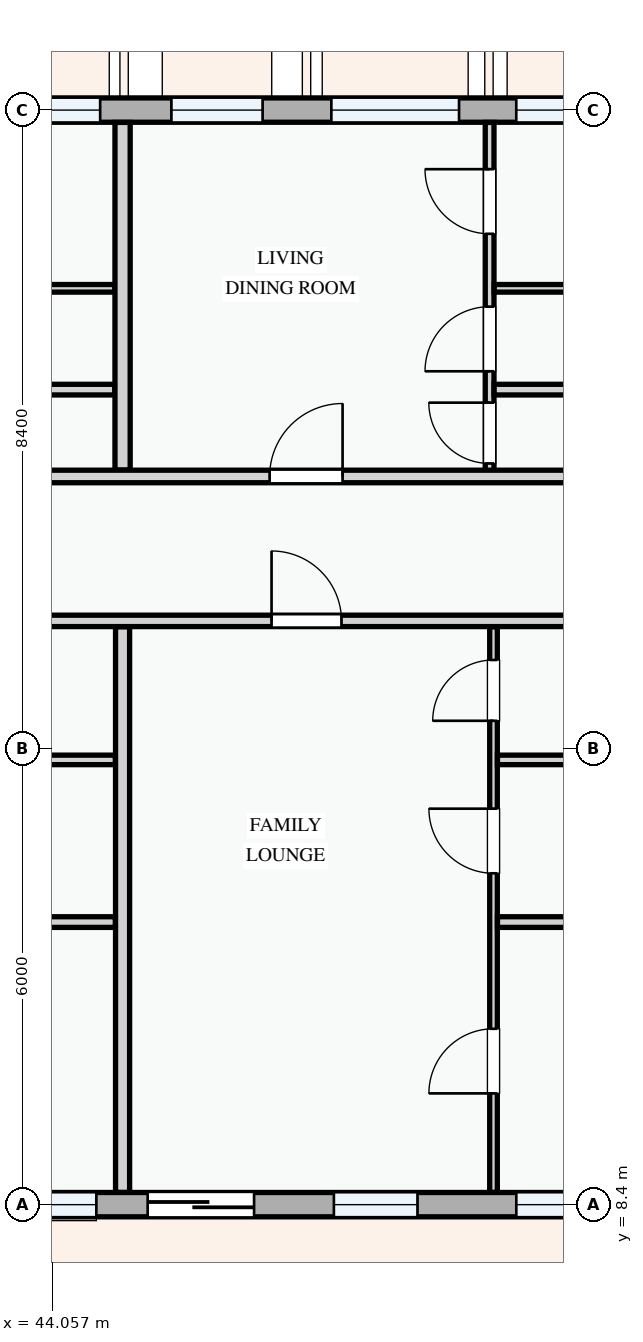
"""IFC4 building model, lengths in metres.
Left out: names, types, materials, properties, quantities, classifications, styles, units other than length and angle.
Written with IfcOpenShell. Run it as: python <this file> out.ifc"""

import sys

from ifc_helpers import new_model, si_unit, direction, frame, frame_2d, origin, place, context, subcontext, project, spatial, rectangle, extrude, element, fill, save


model = new_model("IFC4")
c1 = context("Model", 3, precision=1e-05, world=origin(), true_north=direction((0.0, 1.0)))
c2 = subcontext(c1, "Body", "Model", "MODEL_VIEW")
j1 = project(units=[si_unit("LENGTHUNIT", "METRE"), si_unit("PLANEANGLEUNIT", "RADIAN")], contexts=[c1])
p1 = place(None, origin())
s1 = spatial("IfcSite", under=j1, at=p1, CompositionType="ELEMENT")
p2 = place(p1, origin())
s2 = spatial("IfcBuilding", under=s1, at=p2, CompositionType="ELEMENT")
p3 = place(p2, frame((0.0, 0.0, 14.7)))
s3 = spatial("IfcBuildingStorey", under=s2, at=p3, CompositionType="ELEMENT", Elevation=14.7)
p4 = place(p3, frame((43.2, 8.4, 0.0), z_axis=(0.0, 0.0, 1.0), x_axis=(1.0, 0.0, 0.0)))
e1 = element("IfcWall", 1, at=p4, inside=s3, PredefinedType="STANDARD", context=c2, shape_type="SweptSolid", body=[
    extrude(rectangle(XDim=8.4, YDim=0.32, at=frame_2d((4.2, 0.0))), origin(), (0.0, 0.0, 1.0), 2.375),
])
p5 = place(p4, frame((2.11, 0.0, 0.0)))
e2 = element("IfcOpeningElement", 2, at=p5, cuts=e1, PredefinedType="OPENING", context=c2, shape_type="SweptSolid", body=[
    extrude(rectangle(XDim=1.4, YDim=2.2, at=frame_2d((0.7, 1.1))), frame((0.0, 0.17, 0.0), z_axis=(0.0, -1.0, 0.0), x_axis=(1.0, 0.0, 0.0)), (0.0, 0.0, 1.0), 0.34),
])
p6 = place(p4, frame((0.535, 0.0, 0.78)))
e3 = element("IfcOpeningElement", 3, at=p6, cuts=e1, PredefinedType="OPENING", context=c2, shape_type="SweptSolid", body=[
    extrude(rectangle(XDim=0.9, YDim=1.2, at=frame_2d((0.45, 0.6))), frame((0.0, 0.17, 0.0), z_axis=(0.0, -1.0, 0.0), x_axis=(1.0, 0.0, 0.0)), (0.0, 0.0, 1.0), 0.34),
])
p7 = place(p4, frame((4.56, 0.0, 0.78)))
e4 = element("IfcOpeningElement", 4, at=p7, cuts=e1, PredefinedType="OPENING", context=c2, shape_type="SweptSolid", body=[
    extrude(rectangle(XDim=1.1, YDim=1.3, at=frame_2d((0.55, 0.65))), frame((0.0, 0.17, 0.0), z_axis=(0.0, -1.0, 0.0), x_axis=(1.0, 0.0, 0.0)), (0.0, 0.0, 1.0), 0.34),
])
p8 = place(p4, frame((6.96, 0.0, 0.78)))
e5 = element("IfcOpeningElement", 5, at=p8, cuts=e1, PredefinedType="OPENING", context=c2, shape_type="SweptSolid", body=[
    extrude(rectangle(XDim=0.95, YDim=1.15, at=frame_2d((0.475, 0.575))), frame((0.0, 0.17, 0.0), z_axis=(0.0, -1.0, 0.0), x_axis=(1.0, 0.0, 0.0)), (0.0, 0.0, 1.0), 0.34),
])
p9 = place(p3, frame((51.6, 22.8, 0.0), z_axis=(0.0, 0.0, 1.0), x_axis=(-1.0, 0.0, 0.0)))
e6 = element("IfcWall", 6, at=p9, inside=s3, PredefinedType="STANDARD", context=c2, shape_type="SweptSolid", body=[
    extrude(rectangle(XDim=8.4, YDim=0.32, at=frame_2d((4.2, 0.0))), origin(), (0.0, 0.0, 1.0), 2.375),
])
p10 = place(p9, frame((0.541, 0.0, 0.78)))
e7 = element("IfcOpeningElement", 7, at=p10, cuts=e6, PredefinedType="OPENING", context=c2, shape_type="SweptSolid", body=[
    extrude(rectangle(XDim=0.9, YDim=1.2, at=frame_2d((0.45, 0.6))), frame((0.0, 0.17, 0.0), z_axis=(0.0, -1.0, 0.0), x_axis=(1.0, 0.0, 0.0)), (0.0, 0.0, 1.0), 0.34),
])
p11 = place(p9, frame((2.193, 0.0, 0.78)))
e8 = element("IfcOpeningElement", 8, at=p11, cuts=e6, PredefinedType="OPENING", context=c2, shape_type="SweptSolid", body=[
    extrude(rectangle(XDim=1.68, YDim=1.46, at=frame_2d((0.84, 0.73))), frame((0.0, 0.17, 0.0), z_axis=(0.0, -1.0, 0.0), x_axis=(1.0, 0.0, 0.0)), (0.0, 0.0, 1.0), 0.34),
])
p12 = place(p9, frame((4.778, 0.0, 0.78)))
e9 = element("IfcOpeningElement", 9, at=p12, cuts=e6, PredefinedType="OPENING", context=c2, shape_type="SweptSolid", body=[
    extrude(rectangle(XDim=1.2, YDim=1.35, at=frame_2d((0.6, 0.675))), frame((0.0, 0.17, 0.0), z_axis=(0.0, -1.0, 0.0), x_axis=(1.0, 0.0, 0.0)), (0.0, 0.0, 1.0), 0.34),
])
p13 = place(p9, frame((6.915, 0.0, 0.78)))
e10 = element("IfcOpeningElement", 10, at=p13, cuts=e6, PredefinedType="OPENING", context=c2, shape_type="SweptSolid", body=[
    extrude(rectangle(XDim=1.0, YDim=1.25, at=frame_2d((0.5, 0.625))), frame((0.0, 0.17, 0.0), z_axis=(0.0, -1.0, 0.0), x_axis=(1.0, 0.0, 0.0)), (0.0, 0.0, 1.0), 0.34),
])
p14 = place(p3, frame((39.102, 12.118, 0.0), z_axis=(0.0, 0.0, 1.0), x_axis=(1.0, 0.0, 0.0)))
e11 = element("IfcWall", 11, at=p14, inside=s3, PredefinedType="PARTITIONING", context=c2, shape_type="SweptSolid", body=[
    extrude(rectangle(XDim=5.783, YDim=0.14, at=frame_2d((2.892, 0.0))), origin(), (0.0, 0.0, 1.0), 3.0),
])
p15 = place(p3, frame((39.102, 14.251, 0.0), z_axis=(0.0, 0.0, 1.0), x_axis=(1.0, 0.0, 0.0)))
e12 = element("IfcWall", 12, at=p15, inside=s3, PredefinedType="PARTITIONING", context=c2, shape_type="SweptSolid", body=[
    extrude(rectangle(XDim=5.783, YDim=0.125, at=frame_2d((2.892, 0.0))), origin(), (0.0, 0.0, 1.0), 2.375),
])
p16 = place(p3, frame((39.072, 20.455, 0.0), z_axis=(0.0, 0.0, 1.0), x_axis=(1.0, 0.0, 0.0)))
e13 = element("IfcWall", 13, at=p16, inside=s3, PredefinedType="PARTITIONING", context=c2, shape_type="SweptSolid", body=[
    extrude(rectangle(XDim=5.806, YDim=0.1, at=frame_2d((2.903, 0.0))), origin(), (0.0, 0.0, 1.0), 3.0),
])
p17 = place(p3, frame((39.072, 19.122, 0.0), z_axis=(0.0, 0.0, 1.0), x_axis=(1.0, 0.0, 0.0)))
e14 = element("IfcWall", 14, at=p17, inside=s3, PredefinedType="PARTITIONING", context=c2, shape_type="SweptSolid", body=[
    extrude(rectangle(XDim=5.806, YDim=0.14, at=frame_2d((2.903, 0.0))), origin(), (0.0, 0.0, 1.0), 3.0),
])
p18 = place(p3, frame((49.86, 8.562, 0.0), z_axis=(0.0, 0.0, 1.0), x_axis=(0.0, 1.0, 0.0)))
e15 = element("IfcWall", 15, at=p18, inside=s3, PredefinedType="PARTITIONING", context=c2, shape_type="SweptSolid", body=[
    extrude(rectangle(XDim=7.441, YDim=0.1, at=frame_2d((3.72, 0.0))), origin(), (0.0, 0.0, 1.0), 3.0),
])
p19 = place(p18, frame((1.302, 0.0, 0.0)))
e16 = element("IfcOpeningElement", 16, at=p19, cuts=e15, PredefinedType="OPENING", context=c2, shape_type="SweptSolid", body=[
    extrude(rectangle(XDim=0.85, YDim=2.1, at=frame_2d((0.425, 1.05))), frame((0.0, 0.06, 0.0), z_axis=(0.0, -1.0, 0.0), x_axis=(1.0, 0.0, 0.0)), (0.0, 0.0, 1.0), 0.12),
])
p20 = place(p18, frame((4.198, 0.0, 0.0)))
e17 = element("IfcOpeningElement", 17, at=p20, cuts=e15, PredefinedType="OPENING", context=c2, shape_type="SweptSolid", body=[
    extrude(rectangle(XDim=0.85, YDim=2.1, at=frame_2d((0.425, 1.05))), frame((0.0, 0.06, 0.0), z_axis=(0.0, -1.0, 0.0), x_axis=(1.0, 0.0, 0.0)), (0.0, 0.0, 1.0), 0.12),
])
p21 = place(p18, frame((6.204, 0.0, 0.0)))
e18 = element("IfcOpeningElement", 18, at=p21, cuts=e15, PredefinedType="OPENING", context=c2, shape_type="SweptSolid", body=[
    extrude(rectangle(XDim=0.8, YDim=2.1, at=frame_2d((0.4, 1.05))), frame((0.0, 0.06, 0.0), z_axis=(0.0, -1.0, 0.0), x_axis=(1.0, 0.0, 0.0)), (0.0, 0.0, 1.0), 0.12),
])
p22 = place(p3, frame((49.912, 12.118, 0.0), z_axis=(0.0, 0.0, 1.0), x_axis=(1.0, 0.0, 0.0)))
e19 = element("IfcWall", 19, at=p22, inside=s3, PredefinedType="PARTITIONING", context=c2, shape_type="SweptSolid", body=[
    extrude(rectangle(XDim=7.526, YDim=0.14, at=frame_2d((3.763, 0.0))), origin(), (0.0, 0.0, 1.0), 3.0),
])
p23 = place(p3, frame((49.912, 14.251, 0.0), z_axis=(0.0, 0.0, 1.0), x_axis=(1.0, 0.0, 0.0)))
e20 = element("IfcWall", 20, at=p23, inside=s3, PredefinedType="PARTITIONING", context=c2, shape_type="SweptSolid", body=[
    extrude(rectangle(XDim=7.526, YDim=0.125, at=frame_2d((3.763, 0.0))), origin(), (0.0, 0.0, 1.0), 2.375),
])
p24 = place(p3, frame((49.809, 17.98, 0.0), z_axis=(0.0, 0.0, 1.0), x_axis=(0.0, 1.0, 0.0)))
e21 = element("IfcWall", 21, at=p24, inside=s3, PredefinedType="PARTITIONING", context=c2, shape_type="SweptSolid", body=[
    extrude(rectangle(XDim=4.658, YDim=0.115, at=frame_2d((2.329, 0.0))), origin(), (0.0, 0.0, 1.0), 3.0),
])
p25 = place(p24, frame((0.171, 0.0, 0.0)))
e22 = element("IfcOpeningElement", 22, at=p25, cuts=e21, PredefinedType="OPENING", context=c2, shape_type="SweptSolid", body=[
    extrude(rectangle(XDim=0.8, YDim=2.1, at=frame_2d((0.4, 1.05))), frame((0.0, 0.067, 0.0), z_axis=(0.0, -1.0, 0.0), x_axis=(1.0, 0.0, 0.0)), (0.0, 0.0, 1.0), 0.135),
])
p26 = place(p24, frame((1.384, 0.0, 0.0)))
e23 = element("IfcOpeningElement", 23, at=p26, cuts=e21, PredefinedType="OPENING", context=c2, shape_type="SweptSolid", body=[
    extrude(rectangle(XDim=0.85, YDim=2.1, at=frame_2d((0.425, 1.05))), frame((0.0, 0.067, 0.0), z_axis=(0.0, -1.0, 0.0), x_axis=(1.0, 0.0, 0.0)), (0.0, 0.0, 1.0), 0.135),
])
p27 = place(p24, frame((3.193, 0.0, 0.0)))
e24 = element("IfcOpeningElement", 24, at=p27, cuts=e21, PredefinedType="OPENING", context=c2, shape_type="SweptSolid", body=[
    extrude(rectangle(XDim=0.85, YDim=2.1, at=frame_2d((0.425, 1.05))), frame((0.0, 0.067, 0.0), z_axis=(0.0, -1.0, 0.0), x_axis=(1.0, 0.0, 0.0)), (0.0, 0.0, 1.0), 0.135),
])
p28 = place(p3, frame((49.868, 20.455, 0.0), z_axis=(0.0, 0.0, 1.0), x_axis=(1.0, 0.0, 0.0)))
e25 = element("IfcWall", 25, at=p28, inside=s3, PredefinedType="PARTITIONING", context=c2, shape_type="SweptSolid", body=[
    extrude(rectangle(XDim=7.57, YDim=0.1, at=frame_2d((3.785, 0.0))), origin(), (0.0, 0.0, 1.0), 3.0),
])
p29 = place(p3, frame((49.868, 19.122, 0.0), z_axis=(0.0, 0.0, 1.0), x_axis=(1.0, 0.0, 0.0)))
e26 = element("IfcWall", 26, at=p29, inside=s3, PredefinedType="PARTITIONING", context=c2, shape_type="SweptSolid", body=[
    extrude(rectangle(XDim=7.57, YDim=0.14, at=frame_2d((3.785, 0.0))), origin(), (0.0, 0.0, 1.0), 3.0),
])
p30 = place(p3, frame((44.98, 8.562, 0.0), z_axis=(0.0, 0.0, 1.0), x_axis=(0.0, 1.0, 0.0)))
e27 = element("IfcWall", 27, at=p30, inside=s3, PredefinedType="PARTITIONING", context=c2, shape_type="SweptSolid", body=[
    extrude(rectangle(XDim=7.441, YDim=0.185, at=frame_2d((3.72, 0.0))), origin(), (0.0, 0.0, 1.0), 3.0),
])
p31 = place(p3, frame((44.98, 18.064, 0.0), z_axis=(0.0, 0.0, 1.0), x_axis=(0.0, 1.0, 0.0)))
e28 = element("IfcWall", 28, at=p31, inside=s3, PredefinedType="PARTITIONING", context=c2, shape_type="SweptSolid", body=[
    extrude(rectangle(XDim=4.573, YDim=0.2, at=frame_2d((2.287, 0.0))), origin(), (0.0, 0.0, 1.0), 3.0),
])
p32 = place(p3, frame((22.66, 16.08, 0.0), z_axis=(0.0, 0.0, 1.0), x_axis=(1.0, 0.0, 0.0)))
e29 = element("IfcWall", 29, at=p32, inside=s3, PredefinedType="PARTITIONING", context=c2, shape_type="SweptSolid", body=[
    extrude(rectangle(XDim=34.778, YDim=0.15, at=frame_2d((17.389, 0.0))), origin(), (0.0, 0.0, 1.0), 3.0),
])
p33 = place(p32, frame((2.672, 0.0, 0.0)))
e30 = element("IfcOpeningElement", 30, at=p33, cuts=e29, PredefinedType="OPENING", context=c2, shape_type="SweptSolid", body=[
    extrude(rectangle(XDim=0.96, YDim=2.12, at=frame_2d((0.48, 1.06))), frame((0.0, 0.085, 0.0), z_axis=(0.0, -1.0, 0.0), x_axis=(1.0, 0.0, 0.0)), (0.0, 0.0, 1.0), 0.17),
])
p34 = place(p32, frame((10.71, 0.0, 0.0)))
e31 = element("IfcOpeningElement", 31, at=p34, cuts=e29, PredefinedType="OPENING", context=c2, shape_type="SweptSolid", body=[
    extrude(rectangle(XDim=0.92, YDim=2.1, at=frame_2d((0.46, 1.05))), frame((0.0, 0.085, 0.0), z_axis=(0.0, -1.0, 0.0), x_axis=(1.0, 0.0, 0.0)), (0.0, 0.0, 1.0), 0.17),
])
p35 = place(p32, frame((24.28, 0.0, 0.0)))
e32 = element("IfcOpeningElement", 32, at=p35, cuts=e29, PredefinedType="OPENING", context=c2, shape_type="SweptSolid", body=[
    extrude(rectangle(XDim=0.92, YDim=2.1, at=frame_2d((0.46, 1.05))), frame((0.0, 0.085, 0.0), z_axis=(0.0, -1.0, 0.0), x_axis=(1.0, 0.0, 0.0)), (0.0, 0.0, 1.0), 0.17),
])
p36 = place(p3, frame((22.66, 17.98, 0.0), z_axis=(0.0, 0.0, 1.0), x_axis=(1.0, 0.0, 0.0)))
e33 = element("IfcWall", 33, at=p36, inside=s3, PredefinedType="PARTITIONING", context=c2, shape_type="SweptSolid", body=[
    extrude(rectangle(XDim=34.778, YDim=0.165, at=frame_2d((17.389, 0.0))), origin(), (0.0, 0.0, 1.0), 3.0),
])
p37 = place(p36, frame((2.664, 0.0, 0.0)))
e34 = element("IfcOpeningElement", 34, at=p37, cuts=e33, PredefinedType="OPENING", context=c2, shape_type="SweptSolid", body=[
    extrude(rectangle(XDim=0.92, YDim=2.1, at=frame_2d((0.46, 1.05))), frame((0.0, 0.093, 0.0), z_axis=(0.0, -1.0, 0.0), x_axis=(1.0, 0.0, 0.0)), (0.0, 0.0, 1.0), 0.185),
])
p38 = place(p36, frame((10.71, 0.0, 0.0)))
e35 = element("IfcOpeningElement", 35, at=p38, cuts=e33, PredefinedType="OPENING", context=c2, shape_type="SweptSolid", body=[
    extrude(rectangle(XDim=0.92, YDim=2.1, at=frame_2d((0.46, 1.05))), frame((0.0, 0.093, 0.0), z_axis=(0.0, -1.0, 0.0), x_axis=(1.0, 0.0, 0.0)), (0.0, 0.0, 1.0), 0.185),
])
p39 = place(p36, frame((24.254, 0.0, 0.0)))
e36 = element("IfcOpeningElement", 36, at=p39, cuts=e33, PredefinedType="OPENING", context=c2, shape_type="SweptSolid", body=[
    extrude(rectangle(XDim=0.96, YDim=2.12, at=frame_2d((0.48, 1.06))), frame((0.0, 0.093, 0.0), z_axis=(0.0, -1.0, 0.0), x_axis=(1.0, 0.0, 0.0)), (0.0, 0.0, 1.0), 0.185),
])
p40 = place(p5, frame((1.4, 0.0, 0.0), z_axis=(0.0, 0.0, 1.0), x_axis=(-1.0, 0.0, 0.0)))
e37 = element("IfcDoor", 37, at=p40, inside=s3, OperationType="SLIDING_TO_LEFT", PredefinedType="DOOR", context=c2, shape_type="SweptSolid", body=[
    extrude(rectangle(XDim=1.4, YDim=2.2, at=frame_2d((0.7, 1.1))), frame((0.0, 0.025, 0.0), z_axis=(0.0, -1.0, 0.0), x_axis=(1.0, 0.0, 0.0)), (0.0, 0.0, 1.0), 0.05),
])
fill(e2, e37)
p41 = place(p6, origin())
e38 = element("IfcWindow", 38, at=p41, inside=s3, PartitioningType="SINGLE_PANEL", PredefinedType="WINDOW", context=c2, shape_type="SweptSolid", body=[
    extrude(rectangle(XDim=0.9, YDim=1.2, at=frame_2d((0.45, 0.6))), frame((0.0, 0.03, 0.0), z_axis=(0.0, -1.0, 0.0), x_axis=(1.0, 0.0, 0.0)), (0.0, 0.0, 1.0), 0.06),
])
fill(e3, e38)
p42 = place(p7, origin())
e39 = element("IfcWindow", 39, at=p42, inside=s3, PartitioningType="SINGLE_PANEL", PredefinedType="WINDOW", context=c2, shape_type="SweptSolid", body=[
    extrude(rectangle(XDim=1.1, YDim=1.3, at=frame_2d((0.55, 0.65))), frame((0.0, 0.03, 0.0), z_axis=(0.0, -1.0, 0.0), x_axis=(1.0, 0.0, 0.0)), (0.0, 0.0, 1.0), 0.06),
])
fill(e4, e39)
p43 = place(p8, origin())
e40 = element("IfcWindow", 40, at=p43, inside=s3, PartitioningType="SINGLE_PANEL", PredefinedType="WINDOW", context=c2, shape_type="SweptSolid", body=[
    extrude(rectangle(XDim=0.95, YDim=1.15, at=frame_2d((0.475, 0.575))), frame((0.0, 0.03, 0.0), z_axis=(0.0, -1.0, 0.0), x_axis=(1.0, 0.0, 0.0)), (0.0, 0.0, 1.0), 0.06),
])
fill(e5, e40)
p44 = place(p10, origin())
e41 = element("IfcWindow", 41, at=p44, inside=s3, PartitioningType="SINGLE_PANEL", PredefinedType="WINDOW", context=c2, shape_type="SweptSolid", body=[
    extrude(rectangle(XDim=0.9, YDim=1.2, at=frame_2d((0.45, 0.6))), frame((0.0, 0.03, 0.0), z_axis=(0.0, -1.0, 0.0), x_axis=(1.0, 0.0, 0.0)), (0.0, 0.0, 1.0), 0.06),
])
fill(e7, e41)
p45 = place(p11, origin())
e42 = element("IfcWindow", 42, at=p45, inside=s3, PartitioningType="DOUBLE_PANEL_VERTICAL", PredefinedType="WINDOW", context=c2, shape_type="SweptSolid", body=[
    extrude(rectangle(XDim=1.68, YDim=1.46, at=frame_2d((0.84, 0.73))), frame((0.0, 0.03, 0.0), z_axis=(0.0, -1.0, 0.0), x_axis=(1.0, 0.0, 0.0)), (0.0, 0.0, 1.0), 0.06),
])
fill(e8, e42)
p46 = place(p12, origin())
e43 = element("IfcWindow", 43, at=p46, inside=s3, PartitioningType="SINGLE_PANEL", PredefinedType="WINDOW", context=c2, shape_type="SweptSolid", body=[
    extrude(rectangle(XDim=1.2, YDim=1.35, at=frame_2d((0.6, 0.675))), frame((0.0, 0.03, 0.0), z_axis=(0.0, -1.0, 0.0), x_axis=(1.0, 0.0, 0.0)), (0.0, 0.0, 1.0), 0.06),
])
fill(e9, e43)
p47 = place(p13, origin())
e44 = element("IfcWindow", 44, at=p47, inside=s3, PartitioningType="SINGLE_PANEL", PredefinedType="WINDOW", context=c2, shape_type="SweptSolid", body=[
    extrude(rectangle(XDim=1.0, YDim=1.25, at=frame_2d((0.5, 0.625))), frame((0.0, 0.03, 0.0), z_axis=(0.0, -1.0, 0.0), x_axis=(1.0, 0.0, 0.0)), (0.0, 0.0, 1.0), 0.06),
])
fill(e10, e44)
p48 = place(p19, origin())
e45 = element("IfcDoor", 45, at=p48, inside=s3, OperationType="SINGLE_SWING_LEFT", PredefinedType="DOOR", context=c2, shape_type="SweptSolid", body=[
    extrude(rectangle(XDim=0.85, YDim=2.1, at=frame_2d((0.425, 1.05))), frame((0.0, 0.025, 0.0), z_axis=(0.0, -1.0, 0.0), x_axis=(1.0, 0.0, 0.0)), (0.0, 0.0, 1.0), 0.05),
])
fill(e16, e45)
p49 = place(p20, origin())
e46 = element("IfcDoor", 46, at=p49, inside=s3, OperationType="SINGLE_SWING_RIGHT", PredefinedType="DOOR", context=c2, shape_type="SweptSolid", body=[
    extrude(rectangle(XDim=0.85, YDim=2.1, at=frame_2d((0.425, 1.05))), frame((0.0, 0.025, 0.0), z_axis=(0.0, -1.0, 0.0), x_axis=(1.0, 0.0, 0.0)), (0.0, 0.0, 1.0), 0.05),
])
fill(e17, e46)
p50 = place(p21, origin())
e47 = element("IfcDoor", 47, at=p50, inside=s3, OperationType="SINGLE_SWING_LEFT", PredefinedType="DOOR", context=c2, shape_type="SweptSolid", body=[
    extrude(rectangle(XDim=0.8, YDim=2.1, at=frame_2d((0.4, 1.05))), frame((0.0, 0.025, 0.0), z_axis=(0.0, -1.0, 0.0), x_axis=(1.0, 0.0, 0.0)), (0.0, 0.0, 1.0), 0.05),
])
fill(e18, e47)
p51 = place(p25, origin())
e48 = element("IfcDoor", 48, at=p51, inside=s3, OperationType="SINGLE_SWING_RIGHT", PredefinedType="DOOR", context=c2, shape_type="SweptSolid", body=[
    extrude(rectangle(XDim=0.8, YDim=2.1, at=frame_2d((0.4, 1.05))), frame((0.0, 0.025, 0.0), z_axis=(0.0, -1.0, 0.0), x_axis=(1.0, 0.0, 0.0)), (0.0, 0.0, 1.0), 0.05),
])
fill(e22, e48)
p52 = place(p26, origin())
e49 = element("IfcDoor", 49, at=p52, inside=s3, OperationType="SINGLE_SWING_LEFT", PredefinedType="DOOR", context=c2, shape_type="SweptSolid", body=[
    extrude(rectangle(XDim=0.85, YDim=2.1, at=frame_2d((0.425, 1.05))), frame((0.0, 0.025, 0.0), z_axis=(0.0, -1.0, 0.0), x_axis=(1.0, 0.0, 0.0)), (0.0, 0.0, 1.0), 0.05),
])
fill(e23, e49)
p53 = place(p27, origin())
e50 = element("IfcDoor", 50, at=p53, inside=s3, OperationType="SINGLE_SWING_RIGHT", PredefinedType="DOOR", context=c2, shape_type="SweptSolid", body=[
    extrude(rectangle(XDim=0.85, YDim=2.1, at=frame_2d((0.425, 1.05))), frame((0.0, 0.025, 0.0), z_axis=(0.0, -1.0, 0.0), x_axis=(1.0, 0.0, 0.0)), (0.0, 0.0, 1.0), 0.05),
])
fill(e24, e50)
p54 = place(p35, origin())
e51 = element("IfcDoor", 51, at=p54, inside=s3, OperationType="SINGLE_SWING_LEFT", PredefinedType="DOOR", context=c2, shape_type="SweptSolid", body=[
    extrude(rectangle(XDim=0.92, YDim=2.1, at=frame_2d((0.46, 1.05))), frame((0.0, 0.025, 0.0), z_axis=(0.0, -1.0, 0.0), x_axis=(1.0, 0.0, 0.0)), (0.0, 0.0, 1.0), 0.05),
])
fill(e32, e51)
p55 = place(p39, origin())
e52 = element("IfcDoor", 52, at=p55, inside=s3, OperationType="SINGLE_SWING_RIGHT", PredefinedType="DOOR", context=c2, shape_type="SweptSolid", body=[
    extrude(rectangle(XDim=0.96, YDim=2.12, at=frame_2d((0.48, 1.06))), frame((0.0, 0.025, 0.0), z_axis=(0.0, -1.0, 0.0), x_axis=(1.0, 0.0, 0.0)), (0.0, 0.0, 1.0), 0.05),
])
fill(e36, e52)
save(model, sys.argv[1])
